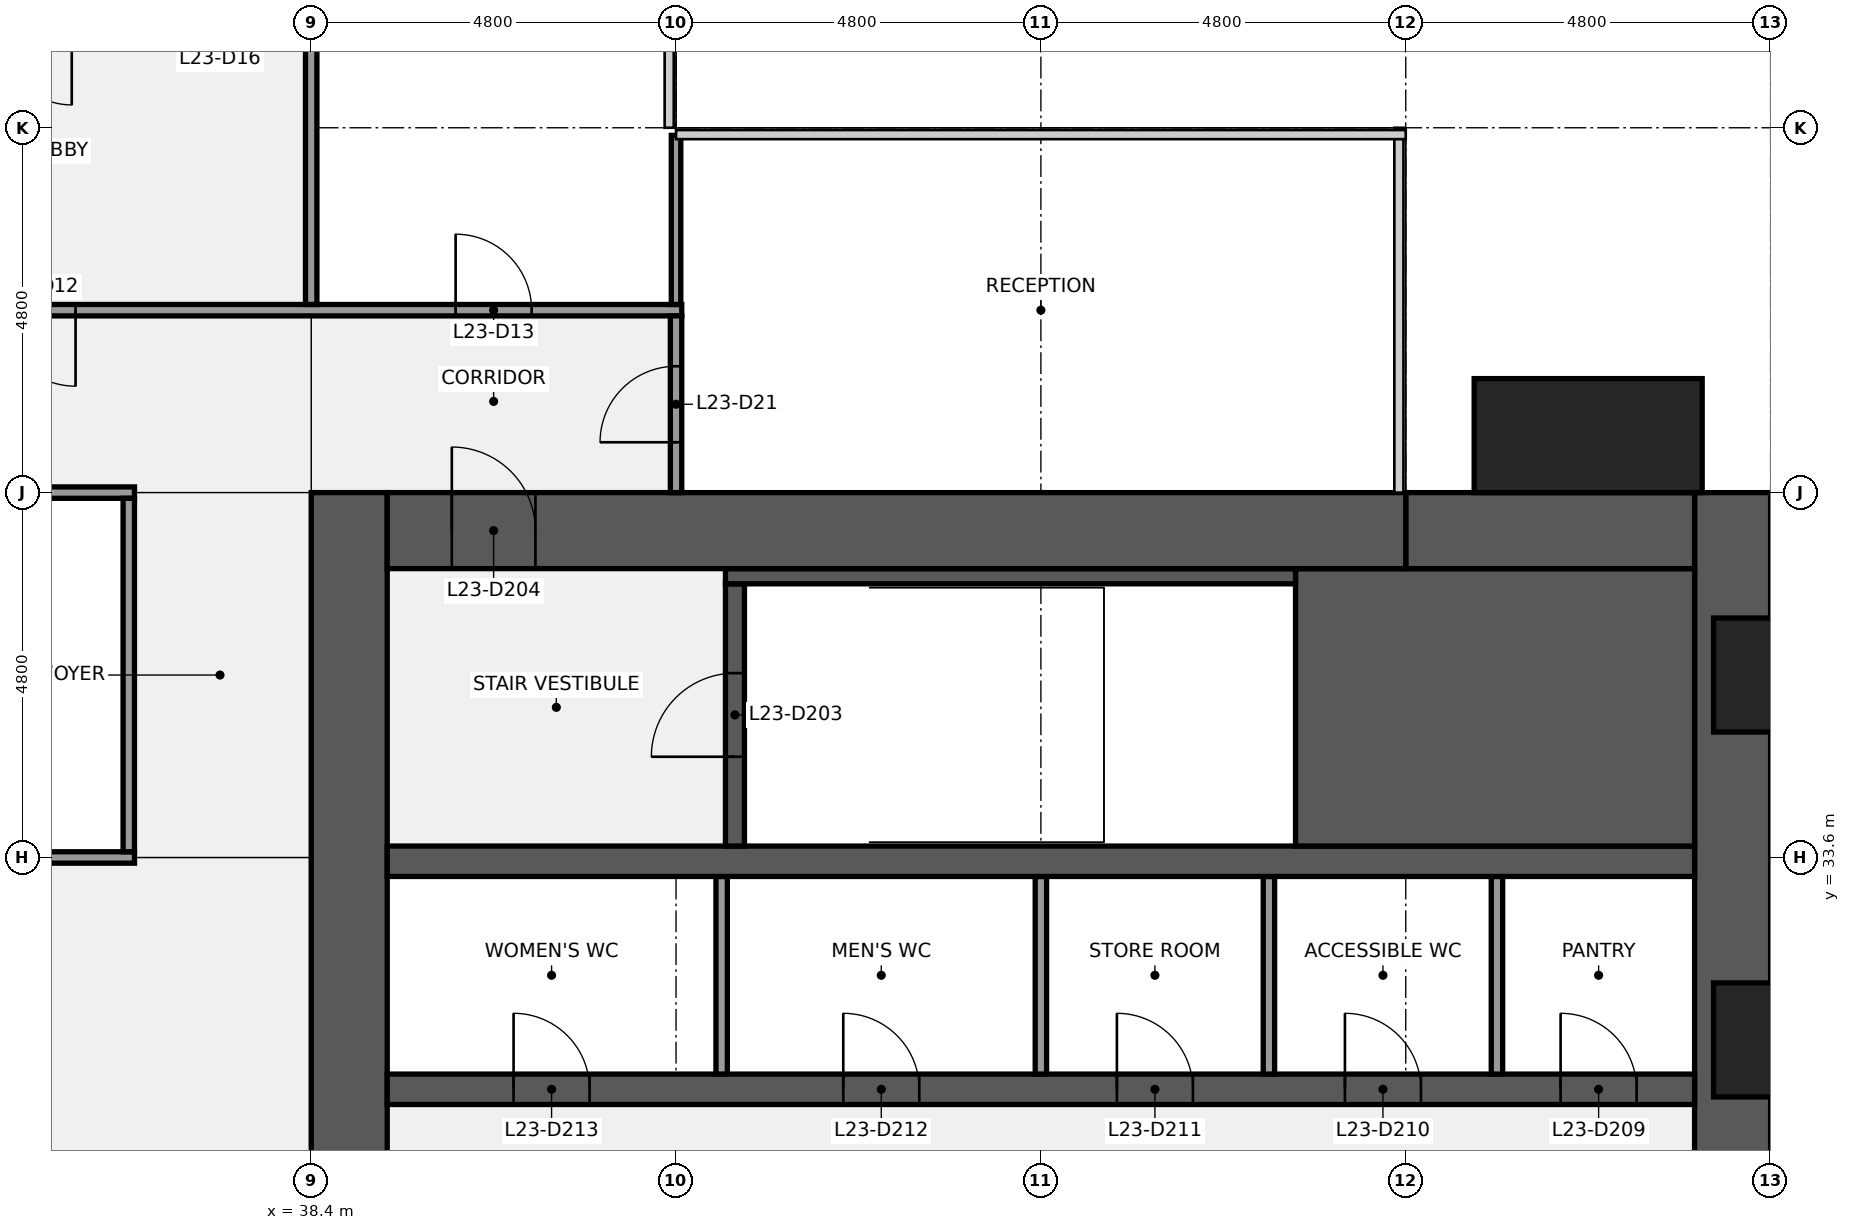
"""IFC4 building model, lengths in metres.
Left out: names, types, materials, properties, quantities, classifications, styles, units other than length and angle.
Written with IfcOpenShell. Run it as: python <this file> out.ifc"""

import sys

from ifc_helpers import new_model, si_unit, direction, frame, frame_2d, origin, origin_2d, place, context, subcontext, project, spatial, rectangle, extrude, element, fill, save


model = new_model("IFC4")
c1 = context("Model", 3, precision=1e-05, world=origin(), true_north=direction((0.0, 1.0)))
c2 = subcontext(c1, "Body", "Model", "MODEL_VIEW")
j1 = project(units=[si_unit("LENGTHUNIT", "METRE"), si_unit("PLANEANGLEUNIT", "RADIAN")], contexts=[c1])
p1 = place(None, origin())
s1 = spatial("IfcSite", under=j1, at=p1, CompositionType="ELEMENT")
p2 = place(p1, origin())
s2 = spatial("IfcBuilding", under=s1, at=p2, CompositionType="ELEMENT")
p3 = place(p2, frame((0.0, 0.0, 112.1)))
s3 = spatial("IfcBuildingStorey", under=s2, at=p3, CompositionType="ELEMENT", Elevation=112.1)
p4 = place(p3, frame((57.1, 38.4, 0.0), z_axis=(0.0, 0.0, 1.0), x_axis=(0.0, -1.0, 0.0)))
e1 = element("IfcWall", 1, at=p4, inside=s3, PredefinedType="SHEAR", context=c2, shape_type="SweptSolid", body=[
    extrude(rectangle(XDim=28.8, YDim=1.0, at=frame_2d((14.4, 0.0))), origin(), (0.0, 0.0, 1.0), 3.84),
])
p5 = place(p4, frame((18.45, 0.0, 0.9)))
e2 = element("IfcOpeningElement", 2, at=p5, cuts=e1, PredefinedType="OPENING", context=c2, shape_type="SweptSolid", body=[
    extrude(rectangle(XDim=1.5, YDim=1.5, at=frame_2d((0.75, 0.75))), frame((0.0, 0.51, 0.0), z_axis=(0.0, -1.0, 0.0), x_axis=(1.0, 0.0, 0.0)), (0.0, 0.0, 1.0), 1.02),
])
p6 = place(p4, frame((8.85, 0.0, 0.9)))
e3 = element("IfcOpeningElement", 3, at=p6, cuts=e1, PredefinedType="OPENING", context=c2, shape_type="SweptSolid", body=[
    extrude(rectangle(XDim=1.5, YDim=1.5, at=frame_2d((0.75, 0.75))), frame((0.0, 0.51, 0.0), z_axis=(0.0, -1.0, 0.0), x_axis=(1.0, 0.0, 0.0)), (0.0, 0.0, 1.0), 1.02),
])
p7 = place(p3, frame((38.9, 9.6, 0.0), z_axis=(0.0, 0.0, 1.0), x_axis=(0.0, 1.0, 0.0)))
e4 = element("IfcWall", 4, at=p7, inside=s3, PredefinedType="SHEAR", context=c2, shape_type="SweptSolid", body=[
    extrude(rectangle(XDim=28.8, YDim=1.0, at=frame_2d((14.4, 0.0))), origin(), (0.0, 0.0, 1.0), 3.84),
])
p8 = place(p7, frame((8.7, 0.0, 0.0)))
e5 = element("IfcOpeningElement", 5, at=p8, cuts=e4, PredefinedType="OPENING", context=c2, shape_type="SweptSolid", body=[
    extrude(rectangle(XDim=1.8, YDim=2.1, at=frame_2d((0.9, 1.05))), frame((0.0, 0.51, 0.0), z_axis=(0.0, -1.0, 0.0), x_axis=(1.0, 0.0, 0.0)), (0.0, 0.0, 1.0), 1.02),
])
p9 = place(p7, frame((18.3, 0.0, 0.0)))
e6 = element("IfcOpeningElement", 6, at=p9, cuts=e4, PredefinedType="OPENING", context=c2, shape_type="SweptSolid", body=[
    extrude(rectangle(XDim=1.8, YDim=2.1, at=frame_2d((0.9, 1.05))), frame((0.0, 0.51, 0.0), z_axis=(0.0, -1.0, 0.0), x_axis=(1.0, 0.0, 0.0)), (0.0, 0.0, 1.0), 1.02),
])
p10 = place(p3, frame((39.4, 30.55, 0.0), z_axis=(0.0, 0.0, 1.0), x_axis=(1.0, 0.0, 0.0)))
e7 = element("IfcWall", 7, at=p10, inside=s3, PredefinedType="SHEAR", context=c2, shape_type="SweptSolid", body=[
    extrude(rectangle(XDim=17.2, YDim=0.4, at=frame_2d((8.6, 0.0))), origin(), (0.0, 0.0, 1.0), 3.84),
])
p11 = place(p10, frame((15.438, 0.0, 0.0)))
e8 = element("IfcOpeningElement", 8, at=p11, cuts=e7, PredefinedType="OPENING", context=c2, shape_type="SweptSolid", body=[
    extrude(rectangle(XDim=1.0, YDim=2.1, at=frame_2d((0.5, 1.05))), frame((0.0, 0.21, 0.0), z_axis=(0.0, -1.0, 0.0), x_axis=(1.0, 0.0, 0.0)), (0.0, 0.0, 1.0), 0.42),
])
p12 = place(p10, frame((12.6, 0.0, 0.0)))
e9 = element("IfcOpeningElement", 9, at=p12, cuts=e7, PredefinedType="OPENING", context=c2, shape_type="SweptSolid", body=[
    extrude(rectangle(XDim=1.0, YDim=2.1, at=frame_2d((0.5, 1.05))), frame((0.0, 0.21, 0.0), z_axis=(0.0, -1.0, 0.0), x_axis=(1.0, 0.0, 0.0)), (0.0, 0.0, 1.0), 0.42),
])
p13 = place(p10, frame((9.6, 0.0, 0.0)))
e10 = element("IfcOpeningElement", 10, at=p13, cuts=e7, PredefinedType="OPENING", context=c2, shape_type="SweptSolid", body=[
    extrude(rectangle(XDim=1.0, YDim=2.1, at=frame_2d((0.5, 1.05))), frame((0.0, 0.21, 0.0), z_axis=(0.0, -1.0, 0.0), x_axis=(1.0, 0.0, 0.0)), (0.0, 0.0, 1.0), 0.42),
])
p14 = place(p10, frame((6.0, 0.0, 0.0)))
e11 = element("IfcOpeningElement", 11, at=p14, cuts=e7, PredefinedType="OPENING", context=c2, shape_type="SweptSolid", body=[
    extrude(rectangle(XDim=1.0, YDim=2.1, at=frame_2d((0.5, 1.05))), frame((0.0, 0.21, 0.0), z_axis=(0.0, -1.0, 0.0), x_axis=(1.0, 0.0, 0.0)), (0.0, 0.0, 1.0), 0.42),
])
p15 = place(p10, frame((1.663, 0.0, 0.0)))
e12 = element("IfcOpeningElement", 12, at=p15, cuts=e7, PredefinedType="OPENING", context=c2, shape_type="SweptSolid", body=[
    extrude(rectangle(XDim=1.0, YDim=2.1, at=frame_2d((0.5, 1.05))), frame((0.0, 0.21, 0.0), z_axis=(0.0, -1.0, 0.0), x_axis=(1.0, 0.0, 0.0)), (0.0, 0.0, 1.0), 0.42),
])
for number, where, z_axis, x_axis in (
    (13, (54.0, 30.75, 0.0), (0.0, 0.0, 1.0), (0.0, 1.0, 0.0)),
    (14, (51.0, 30.75, 0.0), (0.0, 0.0, 1.0), (0.0, 1.0, 0.0)),
    (15, (48.0, 30.75, 0.0), (0.0, 0.0, 1.0), (0.0, 1.0, 0.0)),
    (16, (43.8, 30.75, 0.0), (0.0, 0.0, 1.0), (0.0, 1.0, 0.0)),
):
    element("IfcWall", number, at=place(p3, frame(where, z_axis=z_axis, x_axis=x_axis)), inside=s3, PredefinedType="PARTITIONING", context=c2, shape_type="SweptSolid", body=[
        extrude(rectangle(XDim=2.6, YDim=0.15, at=frame_2d((1.3, 0.0))), origin(), (0.0, 0.0, 1.0), 3.84),
    ])
p16 = place(p3, frame((39.4, 33.55, 0.0), z_axis=(0.0, 0.0, 1.0), x_axis=(1.0, 0.0, 0.0)))
e17 = element("IfcWall", 17, at=p16, inside=s3, PredefinedType="SHEAR", context=c2, shape_type="SweptSolid", body=[
    extrude(rectangle(XDim=17.2, YDim=0.4, at=frame_2d((8.6, 0.0))), origin(), (0.0, 0.0, 1.0), 3.84),
])
p17 = place(p3, frame((51.35, 35.575, 0.0), z_axis=(0.0, 0.0, 1.0), x_axis=(1.0, 0.0, 0.0)))
e18 = element("IfcWall", 18, at=p17, inside=s3, PredefinedType="SHEAR", context=c2, shape_type="SweptSolid", body=[
    extrude(rectangle(XDim=5.25, YDim=3.65, at=frame_2d((2.625, 0.0))), origin(), (0.0, 0.0, 1.0), 3.84),
])
p18 = place(p3, frame((43.975, 33.75, 0.0), z_axis=(0.0, 0.0, 1.0), x_axis=(0.0, 1.0, 0.0)))
e19 = element("IfcWall", 19, at=p18, inside=s3, PredefinedType="SHEAR", context=c2, shape_type="SweptSolid", body=[
    extrude(rectangle(XDim=3.45, YDim=0.25, at=frame_2d((1.725, 0.0))), origin(), (0.0, 0.0, 1.0), 3.84),
])
p19 = place(p18, frame((1.175, 0.0, 0.0)))
e20 = element("IfcOpeningElement", 20, at=p19, cuts=e19, PredefinedType="OPENING", context=c2, shape_type="SweptSolid", body=[
    extrude(rectangle(XDim=1.1, YDim=2.1, at=frame_2d((0.55, 1.05))), frame((0.0, 0.135, 0.0), z_axis=(0.0, -1.0, 0.0), x_axis=(1.0, 0.0, 0.0)), (0.0, 0.0, 1.0), 0.27),
])
p20 = place(p3, frame((43.85, 37.3, 0.0), z_axis=(0.0, 0.0, 1.0), x_axis=(1.0, 0.0, 0.0)))
e21 = element("IfcWall", 21, at=p20, inside=s3, PredefinedType="SHEAR", context=c2, shape_type="SweptSolid", body=[
    extrude(rectangle(XDim=7.5, YDim=0.2, at=frame_2d((3.75, 0.0))), origin(), (0.0, 0.0, 1.0), 3.84),
])
p21 = place(p3, frame((52.8, 37.9, 0.0), z_axis=(0.0, 0.0, 1.0), x_axis=(1.0, 0.0, 0.0)))
e22 = element("IfcWall", 22, at=p21, inside=s3, PredefinedType="SHEAR", context=c2, shape_type="SweptSolid", body=[
    extrude(rectangle(XDim=3.8, YDim=1.0, at=frame_2d((1.9, 0.0))), origin(), (0.0, 0.0, 1.0), 3.84),
])
p22 = place(p3, frame((39.4, 37.9, 0.0), z_axis=(0.0, 0.0, 1.0), x_axis=(1.0, 0.0, 0.0)))
e23 = element("IfcWall", 23, at=p22, inside=s3, PredefinedType="SHEAR", context=c2, shape_type="SweptSolid", body=[
    extrude(rectangle(XDim=13.4, YDim=1.0, at=frame_2d((6.7, 0.0))), origin(), (0.0, 0.0, 1.0), 3.84),
])
p23 = place(p22, frame((0.85, 0.0, 0.0)))
e24 = element("IfcOpeningElement", 24, at=p23, cuts=e23, PredefinedType="OPENING", context=c2, shape_type="SweptSolid", body=[
    extrude(rectangle(XDim=1.1, YDim=2.1, at=frame_2d((0.55, 1.05))), frame((0.0, 0.51, 0.0), z_axis=(0.0, -1.0, 0.0), x_axis=(1.0, 0.0, 0.0)), (0.0, 0.0, 1.0), 1.02),
])
p24 = place(p3, frame((33.675, 33.6, 0.0), z_axis=(0.0, 0.0, 1.0), x_axis=(1.0, 0.0, 0.0)))
e25 = element("IfcWall", 25, at=p24, inside=s3, PredefinedType="PARTITIONING", context=c2, shape_type="SweptSolid", body=[
    extrude(rectangle(XDim=2.4, YDim=0.15, at=frame_2d((1.2, 0.0))), origin(), (0.0, 0.0, 1.0), 2.849),
])
p25 = place(p3, frame((21.525, 38.4, 0.0), z_axis=(0.0, 0.0, 1.0), x_axis=(1.0, 0.0, 0.0)))
e26 = element("IfcWall", 26, at=p25, inside=s3, PredefinedType="PARTITIONING", context=c2, shape_type="SweptSolid", body=[
    extrude(rectangle(XDim=14.55, YDim=0.15, at=frame_2d((7.275, 0.0))), origin(), (0.0, 0.0, 1.0), 2.849),
])
p26 = place(p25, frame((3.175, 0.0, 0.0)))
e27 = element("IfcOpeningElement", 27, at=p26, cuts=e26, PredefinedType="OPENING", context=c2, shape_type="SweptSolid", body=[
    extrude(rectangle(XDim=1.0, YDim=2.1, at=frame_2d((0.5, 1.05))), frame((0.0, 0.085, 0.0), z_axis=(0.0, -1.0, 0.0), x_axis=(1.0, 0.0, 0.0)), (0.0, 0.0, 1.0), 0.17),
])
p27 = place(p25, frame((10.375, 0.0, 0.0)))
e28 = element("IfcOpeningElement", 28, at=p27, cuts=e26, PredefinedType="OPENING", context=c2, shape_type="SweptSolid", body=[
    extrude(rectangle(XDim=1.0, YDim=2.1, at=frame_2d((0.5, 1.05))), frame((0.0, 0.085, 0.0), z_axis=(0.0, -1.0, 0.0), x_axis=(1.0, 0.0, 0.0)), (0.0, 0.0, 1.0), 0.17),
])
p28 = place(p3, frame((14.325, 40.8, 0.0), z_axis=(0.0, 0.0, 1.0), x_axis=(1.0, 0.0, 0.0)))
e29 = element("IfcWall", 29, at=p28, inside=s3, PredefinedType="PARTITIONING", context=c2, shape_type="SweptSolid", body=[
    extrude(rectangle(XDim=28.95, YDim=0.15, at=frame_2d((14.475, 0.0))), origin(), (0.0, 0.0, 1.0), 2.849),
])
p29 = place(p28, frame((1.975, 0.0, 0.0)))
e30 = element("IfcOpeningElement", 30, at=p29, cuts=e29, PredefinedType="OPENING", context=c2, shape_type="SweptSolid", body=[
    extrude(rectangle(XDim=1.0, YDim=2.1, at=frame_2d((0.5, 1.05))), frame((0.0, 0.085, 0.0), z_axis=(0.0, -1.0, 0.0), x_axis=(1.0, 0.0, 0.0)), (0.0, 0.0, 1.0), 0.17),
])
p30 = place(p28, frame((10.375, 0.0, 0.0)))
e31 = element("IfcOpeningElement", 31, at=p30, cuts=e29, PredefinedType="OPENING", context=c2, shape_type="SweptSolid", body=[
    extrude(rectangle(XDim=1.0, YDim=2.1, at=frame_2d((0.5, 1.05))), frame((0.0, 0.085, 0.0), z_axis=(0.0, -1.0, 0.0), x_axis=(1.0, 0.0, 0.0)), (0.0, 0.0, 1.0), 0.17),
])
p31 = place(p28, frame((19.975, 0.0, 0.0)))
e32 = element("IfcOpeningElement", 32, at=p31, cuts=e29, PredefinedType="OPENING", context=c2, shape_type="SweptSolid", body=[
    extrude(rectangle(XDim=1.0, YDim=2.1, at=frame_2d((0.5, 1.05))), frame((0.0, 0.085, 0.0), z_axis=(0.0, -1.0, 0.0), x_axis=(1.0, 0.0, 0.0)), (0.0, 0.0, 1.0), 0.17),
])
p32 = place(p28, frame((25.975, 0.0, 0.0)))
e33 = element("IfcOpeningElement", 33, at=p32, cuts=e29, PredefinedType="OPENING", context=c2, shape_type="SweptSolid", body=[
    extrude(rectangle(XDim=1.0, YDim=2.1, at=frame_2d((0.5, 1.05))), frame((0.0, 0.085, 0.0), z_axis=(0.0, -1.0, 0.0), x_axis=(1.0, 0.0, 0.0)), (0.0, 0.0, 1.0), 0.17),
])
p33 = place(p3, frame((36.0, 33.675, 0.0), z_axis=(0.0, 0.0, 1.0), x_axis=(0.0, 1.0, 0.0)))
e34 = element("IfcWall", 34, at=p33, inside=s3, PredefinedType="PARTITIONING", context=c2, shape_type="SweptSolid", body=[
    extrude(rectangle(XDim=4.65, YDim=0.15, at=frame_2d((2.325, 0.0))), origin(), (0.0, 0.0, 1.0), 2.849),
])
p34 = place(p3, frame((38.4, 40.875, 0.0), z_axis=(0.0, 0.0, 1.0), x_axis=(0.0, 1.0, 0.0)))
e35 = element("IfcWall", 35, at=p34, inside=s3, PredefinedType="PARTITIONING", context=c2, shape_type="SweptSolid", body=[
    extrude(rectangle(XDim=3.45, YDim=0.15, at=frame_2d((1.725, 0.0))), origin(), (0.0, 0.0, 1.0), 2.849),
])
p35 = place(p3, frame((43.2, 40.875, 0.0), z_axis=(0.0, 0.0, 1.0), x_axis=(0.0, 1.0, 0.0)))
e36 = element("IfcWall", 36, at=p35, inside=s3, PredefinedType="PARTITIONING", context=c2, shape_type="SweptSolid", body=[
    extrude(rectangle(XDim=2.225, YDim=0.125, at=frame_2d((1.113, 0.0))), origin(), (0.0, 0.0, 1.0), 2.849),
])
p36 = place(p3, frame((43.2, 38.4, 0.0), z_axis=(0.0, 0.0, 1.0), x_axis=(0.0, 1.0, 0.0)))
e37 = element("IfcWall", 37, at=p36, inside=s3, PredefinedType="PARTITIONING", context=c2, shape_type="SweptSolid", body=[
    extrude(rectangle(XDim=2.325, YDim=0.15, at=frame_2d((1.163, 0.0))), origin(), (0.0, 0.0, 1.0), 2.849),
])
p37 = place(p36, frame((0.663, 0.0, 0.0)))
e38 = element("IfcOpeningElement", 38, at=p37, cuts=e37, PredefinedType="OPENING", context=c2, shape_type="SweptSolid", body=[
    extrude(rectangle(XDim=1.0, YDim=2.1, at=frame_2d((0.5, 1.05))), frame((0.0, 0.085, 0.0), z_axis=(0.0, -1.0, 0.0), x_axis=(1.0, 0.0, 0.0)), (0.0, 0.0, 1.0), 0.17),
])
p38 = place(p3, frame((55.2, 39.15, 0.0), z_axis=(0.0, 0.0, 1.0), x_axis=(1.0, 0.0, 0.0)))
e39 = element("IfcColumn", 39, at=p38, inside=s3, PredefinedType="PILASTER", context=c2, shape_type="SweptSolid", body=[
    extrude(rectangle(XDim=3.0, YDim=1.5, at=origin_2d()), origin(), (0.0, 0.0, 1.0), 4.0),
])
p39 = place(p19, origin())
e40 = element("IfcDoor", 40, at=p39, inside=s3, OperationType="SINGLE_SWING_LEFT", PredefinedType="DOOR", context=c2, shape_type="SweptSolid", body=[
    extrude(rectangle(XDim=1.1, YDim=2.1, at=frame_2d((0.55, 1.05))), frame((0.0, 0.025, 0.0), z_axis=(0.0, -1.0, 0.0), x_axis=(1.0, 0.0, 0.0)), (0.0, 0.0, 1.0), 0.05),
])
fill(e20, e40)
p40 = place(p23, origin())
e41 = element("IfcDoor", 41, at=p40, inside=s3, OperationType="SINGLE_SWING_LEFT", PredefinedType="DOOR", context=c2, shape_type="SweptSolid", body=[
    extrude(rectangle(XDim=1.1, YDim=2.1, at=frame_2d((0.55, 1.05))), frame((0.0, 0.025, 0.0), z_axis=(0.0, -1.0, 0.0), x_axis=(1.0, 0.0, 0.0)), (0.0, 0.0, 1.0), 0.05),
])
fill(e24, e41)
p41 = place(p11, origin())
e42 = element("IfcDoor", 42, at=p41, inside=s3, OperationType="SINGLE_SWING_LEFT", PredefinedType="DOOR", context=c2, shape_type="SweptSolid", body=[
    extrude(rectangle(XDim=1.0, YDim=2.1, at=frame_2d((0.5, 1.05))), frame((0.0, 0.025, 0.0), z_axis=(0.0, -1.0, 0.0), x_axis=(1.0, 0.0, 0.0)), (0.0, 0.0, 1.0), 0.05),
])
fill(e8, e42)
p42 = place(p12, origin())
e43 = element("IfcDoor", 43, at=p42, inside=s3, OperationType="SINGLE_SWING_LEFT", PredefinedType="DOOR", context=c2, shape_type="SweptSolid", body=[
    extrude(rectangle(XDim=1.0, YDim=2.1, at=frame_2d((0.5, 1.05))), frame((0.0, 0.025, 0.0), z_axis=(0.0, -1.0, 0.0), x_axis=(1.0, 0.0, 0.0)), (0.0, 0.0, 1.0), 0.05),
])
fill(e9, e43)
p43 = place(p13, origin())
e44 = element("IfcDoor", 44, at=p43, inside=s3, OperationType="SINGLE_SWING_LEFT", PredefinedType="DOOR", context=c2, shape_type="SweptSolid", body=[
    extrude(rectangle(XDim=1.0, YDim=2.1, at=frame_2d((0.5, 1.05))), frame((0.0, 0.025, 0.0), z_axis=(0.0, -1.0, 0.0), x_axis=(1.0, 0.0, 0.0)), (0.0, 0.0, 1.0), 0.05),
])
fill(e10, e44)
p44 = place(p14, origin())
e45 = element("IfcDoor", 45, at=p44, inside=s3, OperationType="SINGLE_SWING_LEFT", PredefinedType="DOOR", context=c2, shape_type="SweptSolid", body=[
    extrude(rectangle(XDim=1.0, YDim=2.1, at=frame_2d((0.5, 1.05))), frame((0.0, 0.025, 0.0), z_axis=(0.0, -1.0, 0.0), x_axis=(1.0, 0.0, 0.0)), (0.0, 0.0, 1.0), 0.05),
])
fill(e11, e45)
p45 = place(p15, origin())
e46 = element("IfcDoor", 46, at=p45, inside=s3, OperationType="SINGLE_SWING_LEFT", PredefinedType="DOOR", context=c2, shape_type="SweptSolid", body=[
    extrude(rectangle(XDim=1.0, YDim=2.1, at=frame_2d((0.5, 1.05))), frame((0.0, 0.025, 0.0), z_axis=(0.0, -1.0, 0.0), x_axis=(1.0, 0.0, 0.0)), (0.0, 0.0, 1.0), 0.05),
])
fill(e12, e46)
p46 = place(p31, origin())
e47 = element("IfcDoor", 47, at=p46, inside=s3, OperationType="SINGLE_SWING_RIGHT", PredefinedType="DOOR", context=c2, shape_type="SweptSolid", body=[
    extrude(rectangle(XDim=1.0, YDim=2.1, at=frame_2d((0.5, 1.05))), frame((0.0, 0.025, 0.0), z_axis=(0.0, -1.0, 0.0), x_axis=(1.0, 0.0, 0.0)), (0.0, 0.0, 1.0), 0.05),
])
fill(e32, e47)
p47 = place(p32, origin())
e48 = element("IfcDoor", 48, at=p47, inside=s3, OperationType="SINGLE_SWING_LEFT", PredefinedType="DOOR", context=c2, shape_type="SweptSolid", body=[
    extrude(rectangle(XDim=1.0, YDim=2.1, at=frame_2d((0.5, 1.05))), frame((0.0, 0.025, 0.0), z_axis=(0.0, -1.0, 0.0), x_axis=(1.0, 0.0, 0.0)), (0.0, 0.0, 1.0), 0.05),
])
fill(e33, e48)
p48 = place(p37, origin())
e49 = element("IfcDoor", 49, at=p48, inside=s3, OperationType="SINGLE_SWING_LEFT", PredefinedType="DOOR", context=c2, shape_type="SweptSolid", body=[
    extrude(rectangle(XDim=1.0, YDim=2.1, at=frame_2d((0.5, 1.05))), frame((0.0, 0.025, 0.0), z_axis=(0.0, -1.0, 0.0), x_axis=(1.0, 0.0, 0.0)), (0.0, 0.0, 1.0), 0.05),
])
fill(e38, e49)
save(model, sys.argv[1])
